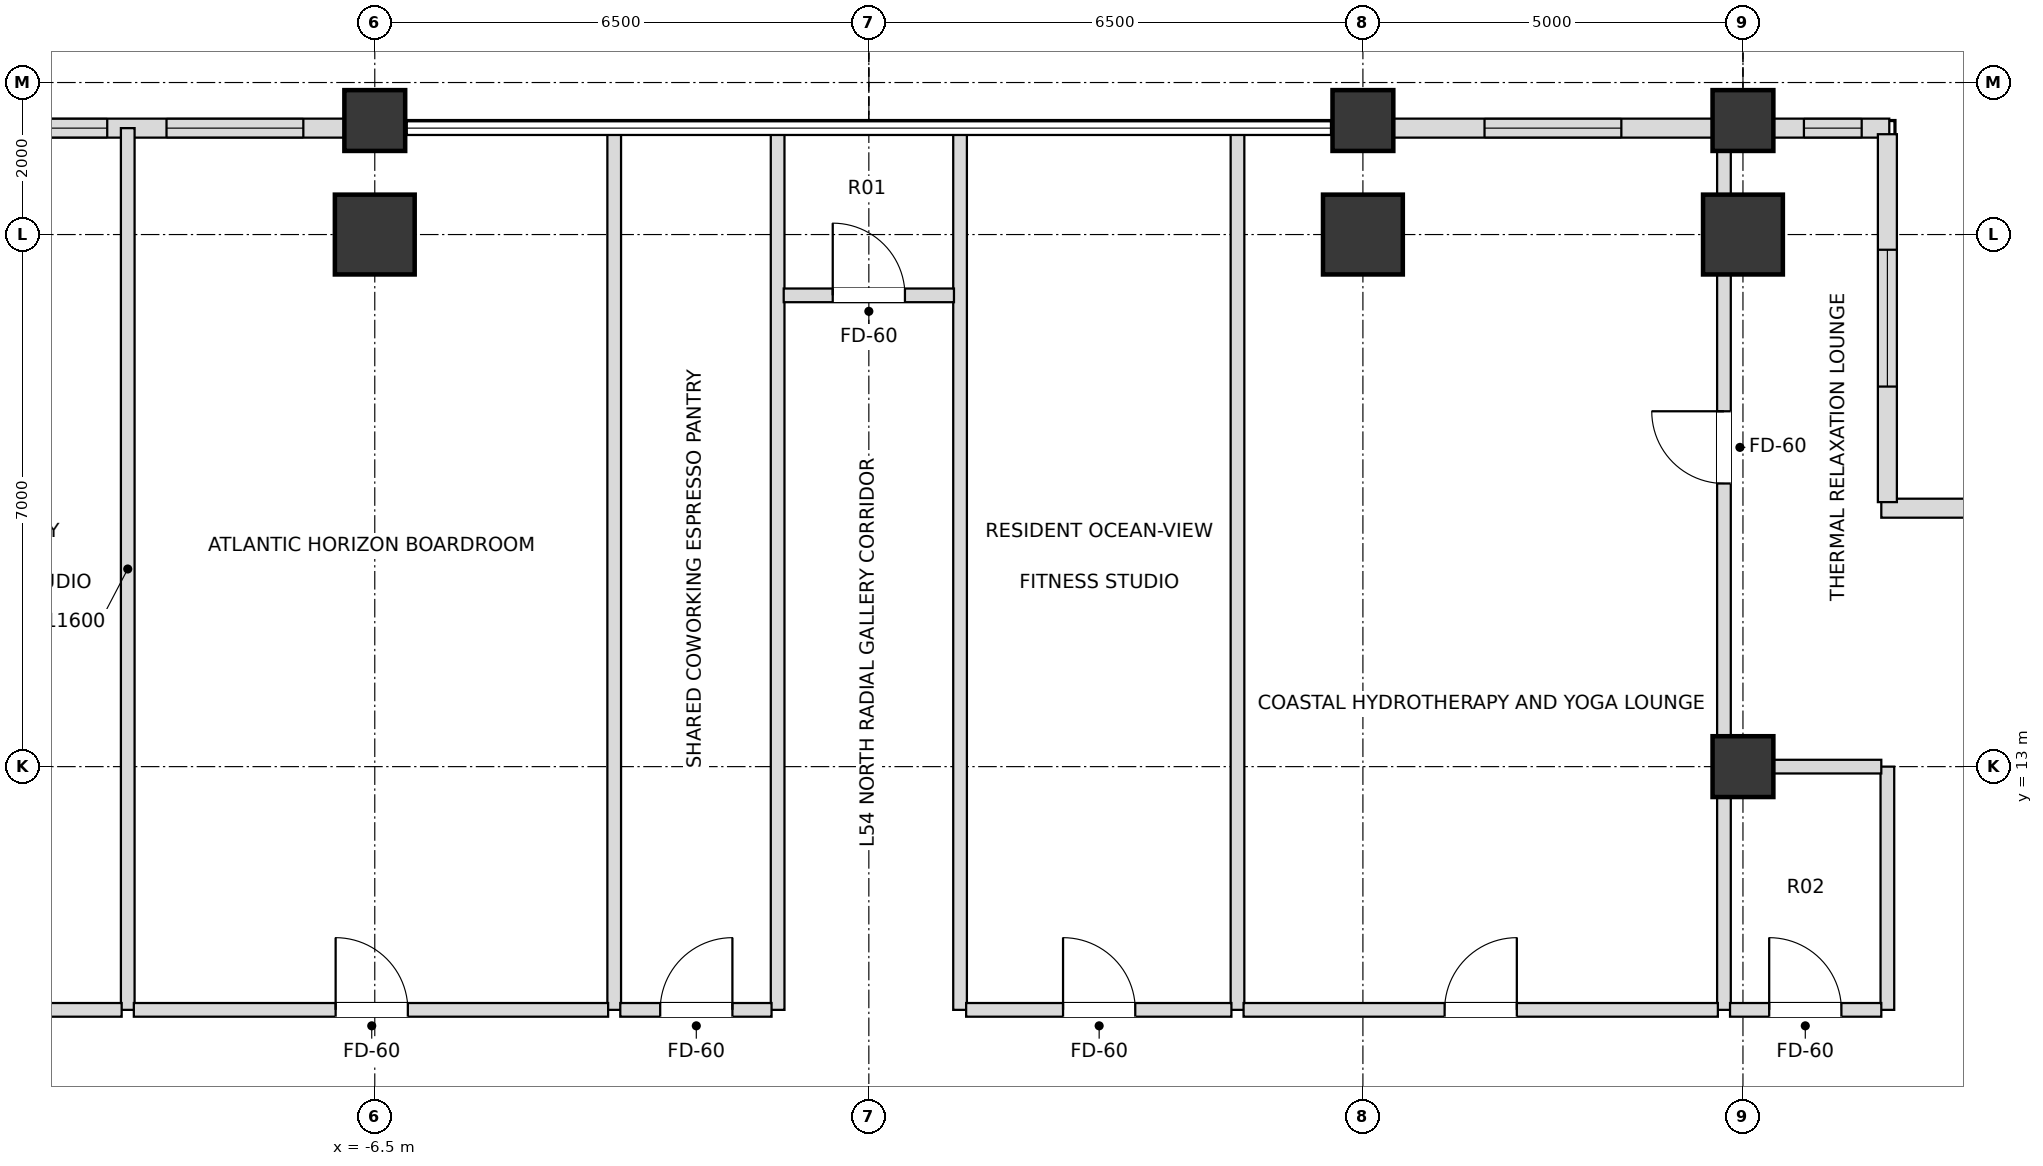
"""IFC4 building model, lengths in metres.
Left out: names, types, materials, properties, quantities, classifications, styles, units other than length and angle.
Written with IfcOpenShell. Run it as: python <this file> out.ifc"""

import sys

from ifc_helpers import new_model, si_unit, direction, frame, frame_2d, origin, origin_2d, place, context, subcontext, project, spatial, rectangle, extrude, element, fill, save


model = new_model("IFC4")
c1 = context("Model", 3, precision=1e-05, world=origin(), true_north=direction((0.0, 1.0)))
c2 = subcontext(c1, "Body", "Model", "MODEL_VIEW")
j1 = project(units=[si_unit("LENGTHUNIT", "METRE"), si_unit("PLANEANGLEUNIT", "RADIAN")], contexts=[c1])
p1 = place(None, origin())
s1 = spatial("IfcSite", under=j1, at=p1, CompositionType="ELEMENT")
p2 = place(p1, origin())
s2 = spatial("IfcBuilding", under=s1, at=p2, CompositionType="ELEMENT")
p3 = place(p2, frame((0.0, 0.0, 208.8)))
s3 = spatial("IfcBuildingStorey", under=s2, at=p3, CompositionType="ELEMENT", Elevation=208.8)
for number, where, z_axis, x_axis in (
    (1, (11.5, 20.0, 0.0), (0.0, 0.0, 1.0), (1.0, 0.0, 0.0)),
    (2, (6.5, 20.0, 0.0), (0.0, 0.0, 1.0), (1.0, 0.0, 0.0)),
    (3, (-6.5, 20.0, 0.0), (0.0, 0.0, 1.0), (1.0, 0.0, 0.0)),
):
    element("IfcColumn", number, at=place(p3, frame(where, z_axis=z_axis, x_axis=x_axis)), inside=s3, PredefinedType="USERDEFINED", context=c2, shape_type="SweptSolid", body=[
        extrude(rectangle(XDim=1.05, YDim=1.05, at=origin_2d()), origin(), (0.0, 0.0, 1.0), 3.6),
    ])
for number, where, z_axis, x_axis in (
    (4, (11.5, 13.0, 0.0), (0.0, 0.0, 1.0), (1.0, 0.0, 0.0)),
    (5, (-6.5, 21.5, 0.0), (0.0, 0.0, 1.0), (1.0, 0.0, 0.0)),
    (6, (6.5, 21.5, 0.0), (0.0, 0.0, 1.0), (1.0, 0.0, 0.0)),
    (7, (11.5, 21.5, 0.0), (0.0, 0.0, 1.0), (1.0, 0.0, 0.0)),
):
    element("IfcColumn", number, at=place(p3, frame(where, z_axis=z_axis, x_axis=x_axis)), inside=s3, PredefinedType="COLUMN", context=c2, shape_type="SweptSolid", body=[
        extrude(rectangle(XDim=0.8, YDim=0.8, at=origin_2d()), origin(), (0.0, 0.0, 1.0), 3.6),
    ])
p4 = place(p3, frame((13.425, 21.4, 0.0), z_axis=(0.0, 0.0, 1.0), x_axis=(-1.0, 0.0, 0.0)))
e8 = element("IfcWall", 8, at=p4, inside=s3, PredefinedType="SOLIDWALL", context=c2, shape_type="SweptSolid", body=[
    extrude(rectangle(XDim=1.53, YDim=0.25, at=frame_2d((0.765, 0.0))), origin(), (0.0, 0.0, 1.0), 2.59),
])
p5 = place(p4, frame((0.363, 0.0, 0.72)))
e9 = element("IfcOpeningElement", 9, at=p5, cuts=e8, PredefinedType="OPENING", context=c2, shape_type="SweptSolid", body=[
    extrude(rectangle(XDim=0.76, YDim=1.68, at=frame_2d((0.38, 0.84))), frame((0.0, 0.135, 0.0), z_axis=(0.0, -1.0, 0.0), x_axis=(1.0, 0.0, 0.0)), (0.0, 0.0, 1.0), 0.27),
])
p6 = place(p3, frame((11.105, 21.4, 0.0), z_axis=(0.0, 0.0, 1.0), x_axis=(-1.0, 0.0, 0.0)))
e10 = element("IfcWall", 10, at=p6, inside=s3, PredefinedType="SOLIDWALL", context=c2, shape_type="SweptSolid", body=[
    extrude(rectangle(XDim=4.21, YDim=0.25, at=frame_2d((2.105, 0.0))), origin(), (0.0, 0.0, 1.0), 2.59),
])
p7 = place(p6, frame((1.205, 0.0, 0.72)))
e11 = element("IfcOpeningElement", 11, at=p7, cuts=e10, PredefinedType="OPENING", context=c2, shape_type="SweptSolid", body=[
    extrude(rectangle(XDim=1.8, YDim=1.68, at=frame_2d((0.9, 0.84))), frame((0.0, 0.135, 0.0), z_axis=(0.0, -1.0, 0.0), x_axis=(1.0, 0.0, 0.0)), (0.0, 0.0, 1.0), 0.27),
])
p8 = place(p3, frame((-6.895, 21.4, 0.0), z_axis=(0.0, 0.0, 1.0), x_axis=(-1.0, 0.0, 0.0)))
e12 = element("IfcWall", 12, at=p8, inside=s3, PredefinedType="SOLIDWALL", context=c2, shape_type="SweptSolid", body=[
    extrude(rectangle(XDim=4.21, YDim=0.25, at=frame_2d((2.105, 0.0))), origin(), (0.0, 0.0, 1.0), 2.59),
])
p9 = place(p8, frame((0.545, 0.0, 0.72)))
e13 = element("IfcOpeningElement", 13, at=p9, cuts=e12, PredefinedType="OPENING", context=c2, shape_type="SweptSolid", body=[
    extrude(rectangle(XDim=1.8, YDim=1.68, at=frame_2d((0.9, 0.84))), frame((0.0, 0.135, 0.0), z_axis=(0.0, -1.0, 0.0), x_axis=(1.0, 0.0, 0.0)), (0.0, 0.0, 1.0), 0.27),
])
p10 = place(p8, frame((3.125, 0.0, 0.72)))
e14 = element("IfcOpeningElement", 14, at=p10, cuts=e12, PredefinedType="OPENING", context=c2, shape_type="SweptSolid", body=[
    extrude(rectangle(XDim=0.76, YDim=1.68, at=frame_2d((0.38, 0.84))), frame((0.0, 0.135, 0.0), z_axis=(0.0, -1.0, 0.0), x_axis=(1.0, 0.0, 0.0)), (0.0, 0.0, 1.0), 0.27),
])
p11 = place(p3, frame((18.48, 16.4, 0.0), z_axis=(0.0, 0.0, 1.0), x_axis=(-1.0, 0.0, 0.0)))
e15 = element("IfcWall", 15, at=p11, inside=s3, PredefinedType="SOLIDWALL", context=c2, shape_type="SweptSolid", body=[
    extrude(rectangle(XDim=5.16, YDim=0.25, at=frame_2d((2.58, 0.0))), origin(), (0.0, 0.0, 1.0), 2.59),
])
p12 = place(p11, frame((1.68, 0.0, 0.72)))
e16 = element("IfcOpeningElement", 16, at=p12, cuts=e15, PredefinedType="OPENING", context=c2, shape_type="SweptSolid", body=[
    extrude(rectangle(XDim=1.8, YDim=1.68, at=frame_2d((0.9, 0.84))), frame((0.0, 0.135, 0.0), z_axis=(0.0, -1.0, 0.0), x_axis=(1.0, 0.0, 0.0)), (0.0, 0.0, 1.0), 0.27),
])
p13 = place(p3, frame((13.4, 16.48, 0.0), z_axis=(0.0, 0.0, 1.0), x_axis=(0.0, 1.0, 0.0)))
e17 = element("IfcWall", 17, at=p13, inside=s3, PredefinedType="SOLIDWALL", context=c2, shape_type="SweptSolid", body=[
    extrude(rectangle(XDim=4.84, YDim=0.25, at=frame_2d((2.42, 0.0))), origin(), (0.0, 0.0, 1.0), 2.59),
])
p14 = place(p13, frame((1.52, 0.0, 0.72)))
e18 = element("IfcOpeningElement", 18, at=p14, cuts=e17, PredefinedType="OPENING", context=c2, shape_type="SweptSolid", body=[
    extrude(rectangle(XDim=1.8, YDim=1.68, at=frame_2d((0.9, 0.84))), frame((0.0, 0.135, 0.0), z_axis=(0.0, -1.0, 0.0), x_axis=(1.0, 0.0, 0.0)), (0.0, 0.0, 1.0), 0.27),
])
for number, where, z_axis, x_axis in (
    (19, (-9.75, 9.8, 0.0), (0.0, 0.0, 1.0), (0.0, 1.0, 0.0)),
    (20, (-3.35, 9.8, 0.0), (0.0, 0.0, 1.0), (0.0, 1.0, 0.0)),
    (21, (-1.2, 9.8, 0.0), (0.0, 0.0, 1.0), (0.0, 1.0, 0.0)),
    (22, (1.2, 9.8, 0.0), (0.0, 0.0, 1.0), (0.0, 1.0, 0.0)),
    (23, (4.85, 9.8, 0.0), (0.0, 0.0, 1.0), (0.0, 1.0, 0.0)),
):
    element("IfcWall", number, at=place(p3, frame(where, z_axis=z_axis, x_axis=x_axis)), inside=s3, PredefinedType="PARTITIONING", context=c2, shape_type="SweptSolid", body=[
        extrude(rectangle(XDim=11.6, YDim=0.18, at=frame_2d((5.8, 0.0))), origin(), (0.0, 0.0, 1.0), 2.746),
    ])
p15 = place(p3, frame((11.25, 9.8, 0.0), z_axis=(0.0, 0.0, 1.0), x_axis=(0.0, 1.0, 0.0)))
e24 = element("IfcWall", 24, at=p15, inside=s3, PredefinedType="PARTITIONING", context=c2, shape_type="SweptSolid", body=[
    extrude(rectangle(XDim=11.6, YDim=0.18, at=frame_2d((5.8, 0.0))), origin(), (0.0, 0.0, 1.0), 2.59),
])
p16 = place(p15, frame((6.925, 0.0, 0.0)))
e25 = element("IfcOpeningElement", 25, at=p16, cuts=e24, PredefinedType="OPENING", context=c2, shape_type="SweptSolid", body=[
    extrude(rectangle(XDim=0.95, YDim=2.15, at=frame_2d((0.475, 1.075))), frame((0.0, 0.1, 0.0), z_axis=(0.0, -1.0, 0.0), x_axis=(1.0, 0.0, 0.0)), (0.0, 0.0, 1.0), 0.2),
])
p17 = place(p3, frame((13.4, 9.8, 0.0), z_axis=(0.0, 0.0, 1.0), x_axis=(0.0, 1.0, 0.0)))
e26 = element("IfcWall", 26, at=p17, inside=s3, PredefinedType="PARTITIONING", context=c2, shape_type="SweptSolid", body=[
    extrude(rectangle(XDim=3.2, YDim=0.18, at=frame_2d((1.6, 0.0))), origin(), (0.0, 0.0, 1.0), 3.3),
])
p18 = place(p3, frame((-13.4, 9.8, 0.0), z_axis=(0.0, 0.0, 1.0), x_axis=(1.0, 0.0, 0.0)))
e27 = element("IfcWall", 27, at=p18, inside=s3, PredefinedType="PARTITIONING", context=c2, shape_type="SweptSolid", body=[
    extrude(rectangle(XDim=3.57, YDim=0.18, at=frame_2d((1.785, 0.0))), origin(), (0.0, 0.0, 1.0), 3.3),
])
p19 = place(p18, frame((1.355, 0.0, 0.0)))
e28 = element("IfcOpeningElement", 28, at=p19, cuts=e27, PredefinedType="OPENING", context=c2, shape_type="SweptSolid", body=[
    extrude(rectangle(XDim=0.95, YDim=2.15, at=frame_2d((0.475, 1.075))), frame((0.0, 0.1, 0.0), z_axis=(0.0, -1.0, 0.0), x_axis=(1.0, 0.0, 0.0)), (0.0, 0.0, 1.0), 0.2),
])
p20 = place(p3, frame((-9.67, 9.8, 0.0), z_axis=(0.0, 0.0, 1.0), x_axis=(1.0, 0.0, 0.0)))
e29 = element("IfcWall", 29, at=p20, inside=s3, PredefinedType="PARTITIONING", context=c2, shape_type="SweptSolid", body=[
    extrude(rectangle(XDim=6.24, YDim=0.18, at=frame_2d((3.12, 0.0))), origin(), (0.0, 0.0, 1.0), 2.746),
])
p21 = place(p20, frame((2.655, 0.0, 0.0)))
e30 = element("IfcOpeningElement", 30, at=p21, cuts=e29, PredefinedType="OPENING", context=c2, shape_type="SweptSolid", body=[
    extrude(rectangle(XDim=0.95, YDim=2.15, at=frame_2d((0.475, 1.075))), frame((0.0, 0.1, 0.0), z_axis=(0.0, -1.0, 0.0), x_axis=(1.0, 0.0, 0.0)), (0.0, 0.0, 1.0), 0.2),
])
p22 = place(p3, frame((-3.27, 9.8, 0.0), z_axis=(0.0, 0.0, 1.0), x_axis=(1.0, 0.0, 0.0)))
e31 = element("IfcWall", 31, at=p22, inside=s3, PredefinedType="PARTITIONING", context=c2, shape_type="SweptSolid", body=[
    extrude(rectangle(XDim=1.99, YDim=0.18, at=frame_2d((0.995, 0.0))), origin(), (0.0, 0.0, 1.0), 3.3),
])
p23 = place(p22, frame((0.525, 0.0, 0.0)))
e32 = element("IfcOpeningElement", 32, at=p23, cuts=e31, PredefinedType="OPENING", context=c2, shape_type="SweptSolid", body=[
    extrude(rectangle(XDim=0.95, YDim=2.15, at=frame_2d((0.475, 1.075))), frame((0.0, 0.1, 0.0), z_axis=(0.0, -1.0, 0.0), x_axis=(1.0, 0.0, 0.0)), (0.0, 0.0, 1.0), 0.2),
])
p24 = place(p3, frame((1.28, 9.8, 0.0), z_axis=(0.0, 0.0, 1.0), x_axis=(1.0, 0.0, 0.0)))
e33 = element("IfcWall", 33, at=p24, inside=s3, PredefinedType="PARTITIONING", context=c2, shape_type="SweptSolid", body=[
    extrude(rectangle(XDim=3.49, YDim=0.18, at=frame_2d((1.745, 0.0))), origin(), (0.0, 0.0, 1.0), 3.3),
])
p25 = place(p24, frame((1.275, 0.0, 0.0)))
e34 = element("IfcOpeningElement", 34, at=p25, cuts=e33, PredefinedType="OPENING", context=c2, shape_type="SweptSolid", body=[
    extrude(rectangle(XDim=0.95, YDim=2.15, at=frame_2d((0.475, 1.075))), frame((0.0, 0.1, 0.0), z_axis=(0.0, -1.0, 0.0), x_axis=(1.0, 0.0, 0.0)), (0.0, 0.0, 1.0), 0.2),
])
p26 = place(p3, frame((4.93, 9.8, 0.0), z_axis=(0.0, 0.0, 1.0), x_axis=(1.0, 0.0, 0.0)))
e35 = element("IfcWall", 35, at=p26, inside=s3, PredefinedType="PARTITIONING", context=c2, shape_type="SweptSolid", body=[
    extrude(rectangle(XDim=6.24, YDim=0.18, at=frame_2d((3.12, 0.0))), origin(), (0.0, 0.0, 1.0), 2.746),
])
p27 = place(p26, frame((2.645, 0.0, 0.0)))
e36 = element("IfcOpeningElement", 36, at=p27, cuts=e35, PredefinedType="OPENING", context=c2, shape_type="SweptSolid", body=[
    extrude(rectangle(XDim=0.95, YDim=2.15, at=frame_2d((0.475, 1.075))), frame((0.0, 0.1, 0.0), z_axis=(0.0, -1.0, 0.0), x_axis=(1.0, 0.0, 0.0)), (0.0, 0.0, 1.0), 0.2),
])
p28 = place(p3, frame((11.33, 9.8, 0.0), z_axis=(0.0, 0.0, 1.0), x_axis=(1.0, 0.0, 0.0)))
e37 = element("IfcWall", 37, at=p28, inside=s3, PredefinedType="PARTITIONING", context=c2, shape_type="SweptSolid", body=[
    extrude(rectangle(XDim=1.99, YDim=0.18, at=frame_2d((0.995, 0.0))), origin(), (0.0, 0.0, 1.0), 3.3),
])
p29 = place(p28, frame((0.515, 0.0, 0.0)))
e38 = element("IfcOpeningElement", 38, at=p29, cuts=e37, PredefinedType="OPENING", context=c2, shape_type="SweptSolid", body=[
    extrude(rectangle(XDim=0.95, YDim=2.15, at=frame_2d((0.475, 1.075))), frame((0.0, 0.1, 0.0), z_axis=(0.0, -1.0, 0.0), x_axis=(1.0, 0.0, 0.0)), (0.0, 0.0, 1.0), 0.2),
])
p30 = place(p3, frame((11.33, 13.0, 0.0), z_axis=(0.0, 0.0, 1.0), x_axis=(1.0, 0.0, 0.0)))
e39 = element("IfcWall", 39, at=p30, inside=s3, PredefinedType="PARTITIONING", context=c2, shape_type="SweptSolid", body=[
    extrude(rectangle(XDim=1.99, YDim=0.18, at=frame_2d((0.995, 0.0))), origin(), (0.0, 0.0, 1.0), 2.59),
])
p31 = place(p3, frame((-1.12, 19.2, 0.0), z_axis=(0.0, 0.0, 1.0), x_axis=(1.0, 0.0, 0.0)))
e40 = element("IfcWall", 40, at=p31, inside=s3, PredefinedType="PARTITIONING", context=c2, shape_type="SweptSolid", body=[
    extrude(rectangle(XDim=2.24, YDim=0.18, at=frame_2d((1.12, 0.0))), origin(), (0.0, 0.0, 1.0), 3.3),
])
p32 = place(p31, frame((0.645, 0.0, 0.0)))
e41 = element("IfcOpeningElement", 41, at=p32, cuts=e40, PredefinedType="OPENING", context=c2, shape_type="SweptSolid", body=[
    extrude(rectangle(XDim=0.95, YDim=2.15, at=frame_2d((0.475, 1.075))), frame((0.0, 0.1, 0.0), z_axis=(0.0, -1.0, 0.0), x_axis=(1.0, 0.0, 0.0)), (0.0, 0.0, 1.0), 0.2),
])
p33 = place(p5, origin())
e42 = element("IfcWindow", 42, at=p33, inside=s3, PartitioningType="SINGLE_PANEL", PredefinedType="WINDOW", context=c2, shape_type="SweptSolid", body=[
    extrude(rectangle(XDim=0.76, YDim=1.68, at=frame_2d((0.38, 0.84))), frame((0.0, 0.03, 0.0), z_axis=(0.0, -1.0, 0.0), x_axis=(1.0, 0.0, 0.0)), (0.0, 0.0, 1.0), 0.06),
])
fill(e9, e42)
p34 = place(p7, origin())
e43 = element("IfcWindow", 43, at=p34, inside=s3, PartitioningType="SINGLE_PANEL", PredefinedType="WINDOW", context=c2, shape_type="SweptSolid", body=[
    extrude(rectangle(XDim=1.8, YDim=1.68, at=frame_2d((0.9, 0.84))), frame((0.0, 0.03, 0.0), z_axis=(0.0, -1.0, 0.0), x_axis=(1.0, 0.0, 0.0)), (0.0, 0.0, 1.0), 0.06),
])
fill(e11, e43)
p35 = place(p9, origin())
e44 = element("IfcWindow", 44, at=p35, inside=s3, PartitioningType="SINGLE_PANEL", PredefinedType="WINDOW", context=c2, shape_type="SweptSolid", body=[
    extrude(rectangle(XDim=1.8, YDim=1.68, at=frame_2d((0.9, 0.84))), frame((0.0, 0.03, 0.0), z_axis=(0.0, -1.0, 0.0), x_axis=(1.0, 0.0, 0.0)), (0.0, 0.0, 1.0), 0.06),
])
fill(e13, e44)
p36 = place(p10, origin())
e45 = element("IfcWindow", 45, at=p36, inside=s3, PartitioningType="SINGLE_PANEL", PredefinedType="WINDOW", context=c2, shape_type="SweptSolid", body=[
    extrude(rectangle(XDim=0.76, YDim=1.68, at=frame_2d((0.38, 0.84))), frame((0.0, 0.03, 0.0), z_axis=(0.0, -1.0, 0.0), x_axis=(1.0, 0.0, 0.0)), (0.0, 0.0, 1.0), 0.06),
])
fill(e14, e45)
p37 = place(p14, origin())
e46 = element("IfcWindow", 46, at=p37, inside=s3, PartitioningType="SINGLE_PANEL", PredefinedType="WINDOW", context=c2, shape_type="SweptSolid", body=[
    extrude(rectangle(XDim=1.8, YDim=1.68, at=frame_2d((0.9, 0.84))), frame((0.0, 0.03, 0.0), z_axis=(0.0, -1.0, 0.0), x_axis=(1.0, 0.0, 0.0)), (0.0, 0.0, 1.0), 0.06),
])
fill(e18, e46)
p38 = place(p32, origin())
e47 = element("IfcDoor", 47, at=p38, inside=s3, OperationType="SINGLE_SWING_LEFT", PredefinedType="DOOR", context=c2, shape_type="SweptSolid", body=[
    extrude(rectangle(XDim=0.95, YDim=2.15, at=frame_2d((0.475, 1.075))), frame((0.0, 0.025, 0.0), z_axis=(0.0, -1.0, 0.0), x_axis=(1.0, 0.0, 0.0)), (0.0, 0.0, 1.0), 0.05),
])
fill(e41, e47)
p39 = place(p21, origin())
e48 = element("IfcDoor", 48, at=p39, inside=s3, OperationType="SINGLE_SWING_LEFT", PredefinedType="DOOR", context=c2, shape_type="SweptSolid", body=[
    extrude(rectangle(XDim=0.95, YDim=2.15, at=frame_2d((0.475, 1.075))), frame((0.0, 0.025, 0.0), z_axis=(0.0, -1.0, 0.0), x_axis=(1.0, 0.0, 0.0)), (0.0, 0.0, 1.0), 0.05),
])
fill(e30, e48)
p40 = place(p23, origin())
e49 = element("IfcDoor", 49, at=p40, inside=s3, OperationType="SINGLE_SWING_RIGHT", PredefinedType="DOOR", context=c2, shape_type="SweptSolid", body=[
    extrude(rectangle(XDim=0.95, YDim=2.15, at=frame_2d((0.475, 1.075))), frame((0.0, 0.025, 0.0), z_axis=(0.0, -1.0, 0.0), x_axis=(1.0, 0.0, 0.0)), (0.0, 0.0, 1.0), 0.05),
])
fill(e32, e49)
p41 = place(p29, origin())
e50 = element("IfcDoor", 50, at=p41, inside=s3, OperationType="SINGLE_SWING_LEFT", PredefinedType="DOOR", context=c2, shape_type="SweptSolid", body=[
    extrude(rectangle(XDim=0.95, YDim=2.15, at=frame_2d((0.475, 1.075))), frame((0.0, 0.025, 0.0), z_axis=(0.0, -1.0, 0.0), x_axis=(1.0, 0.0, 0.0)), (0.0, 0.0, 1.0), 0.05),
])
fill(e38, e50)
p42 = place(p16, origin())
e51 = element("IfcDoor", 51, at=p42, inside=s3, OperationType="SINGLE_SWING_RIGHT", PredefinedType="DOOR", context=c2, shape_type="SweptSolid", body=[
    extrude(rectangle(XDim=0.95, YDim=2.15, at=frame_2d((0.475, 1.075))), frame((0.0, 0.025, 0.0), z_axis=(0.0, -1.0, 0.0), x_axis=(1.0, 0.0, 0.0)), (0.0, 0.0, 1.0), 0.05),
])
fill(e25, e51)
p43 = place(p25, origin())
e52 = element("IfcDoor", 52, at=p43, inside=s3, OperationType="SINGLE_SWING_LEFT", PredefinedType="DOOR", context=c2, shape_type="SweptSolid", body=[
    extrude(rectangle(XDim=0.95, YDim=2.15, at=frame_2d((0.475, 1.075))), frame((0.0, 0.025, 0.0), z_axis=(0.0, -1.0, 0.0), x_axis=(1.0, 0.0, 0.0)), (0.0, 0.0, 1.0), 0.05),
])
fill(e34, e52)
p44 = place(p27, origin())
e53 = element("IfcDoor", 53, at=p44, inside=s3, OperationType="SINGLE_SWING_RIGHT", PredefinedType="DOOR", context=c2, shape_type="SweptSolid", body=[
    extrude(rectangle(XDim=0.95, YDim=2.15, at=frame_2d((0.475, 1.075))), frame((0.0, 0.025, 0.0), z_axis=(0.0, -1.0, 0.0), x_axis=(1.0, 0.0, 0.0)), (0.0, 0.0, 1.0), 0.05),
])
fill(e36, e53)
save(model, sys.argv[1])
